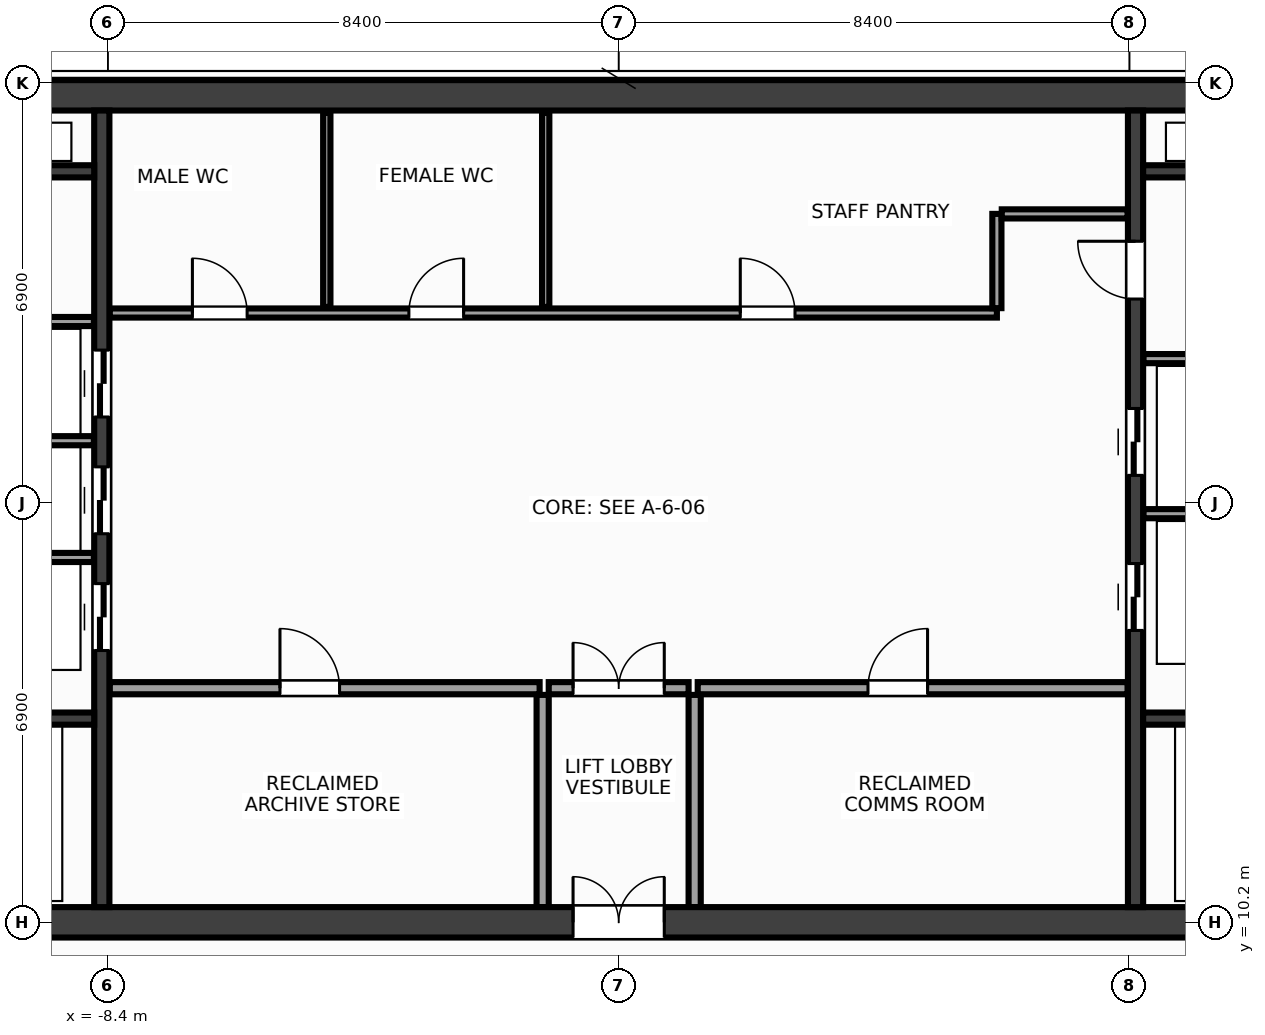
"""IFC4 building model, lengths in metres.
Left out: names, types, materials, properties, quantities, classifications, styles, units other than length and angle.
Written with IfcOpenShell. Run it as: python <this file> out.ifc"""

import sys

from ifc_helpers import new_model, si_unit, direction, frame, frame_2d, origin, place, context, subcontext, project, spatial, rectangle, extrude, source, transform, mapped, element, fill, save


model = new_model("IFC4")
c1 = context("Model", 3, precision=1e-05, world=origin(), true_north=direction((0.0, 1.0)))
c2 = subcontext(c1, "Body", "Model", "MODEL_VIEW")
j1 = project(units=[si_unit("LENGTHUNIT", "METRE"), si_unit("PLANEANGLEUNIT", "RADIAN")], contexts=[c1])
p1 = place(None, origin())
s1 = spatial("IfcSite", under=j1, at=p1, CompositionType="ELEMENT")
p2 = place(p1, origin())
s2 = spatial("IfcBuilding", under=s1, at=p2, CompositionType="ELEMENT")
p3 = place(p2, frame((0.0, 0.0, 290.0)))
s3 = spatial("IfcBuildingStorey", under=s2, at=p3, CompositionType="ELEMENT", Elevation=290.0)
m1 = source(origin(), c2, "Body", "SweptSolid", [
    extrude(rectangle(XDim=31.7, YDim=0.5, at=frame_2d((15.85, 0.0))), origin(), (0.0, 0.0, 1.0), 3.6),
])
p4 = place(p3, frame((-15.85, 23.8, 0.0), z_axis=(0.0, 0.0, 1.0), x_axis=(1.0, 0.0, 0.0)))
e1 = element("IfcWall", 1, at=p4, inside=s3, PredefinedType="SHEAR", context=c2, shape_type="MappedRepresentation", body=[
    mapped(m1, transform((0.0, 0.0, 0.0), x_axis=(1.0, 0.0, 0.0), y_axis=(0.0, 1.0, 0.0), z_axis=(0.0, 0.0, 1.0), scale=1.0)),
])
m2 = source(origin(), c2, "Body", "SweptSolid", [
    extrude(rectangle(XDim=32.4, YDim=0.5, at=frame_2d((16.2, 0.0))), origin(), (0.0, 0.0, 1.0), 3.6),
])
p5 = place(p3, frame((-16.2, 10.2, 0.0), z_axis=(0.0, 0.0, 1.0), x_axis=(1.0, 0.0, 0.0)))
e2 = element("IfcWall", 2, at=p5, inside=s3, PredefinedType="SHEAR", context=c2, shape_type="MappedRepresentation", body=[
    mapped(m2, transform((0.0, 0.0, 0.0), x_axis=(1.0, 0.0, 0.0), y_axis=(0.0, 1.0, 0.0), z_axis=(0.0, 0.0, 1.0), scale=1.0)),
])
p6 = place(p5, frame((2.05, 0.0, 0.0)))
e3 = element("IfcOpeningElement", 3, at=p6, cuts=e2, PredefinedType="OPENING", context=c2, shape_type="SweptSolid", body=[
    extrude(rectangle(XDim=1.6, YDim=2.15, at=frame_2d((0.8, 1.075))), frame((0.0, 0.262, 0.0), z_axis=(0.0, -1.0, 0.0), x_axis=(1.0, 0.0, 0.0)), (0.0, 0.0, 1.0), 0.524),
])
p7 = place(p5, frame((28.75, 0.0, 0.0)))
e4 = element("IfcOpeningElement", 4, at=p7, cuts=e2, PredefinedType="OPENING", context=c2, shape_type="SweptSolid", body=[
    extrude(rectangle(XDim=1.6, YDim=2.15, at=frame_2d((0.8, 1.075))), frame((0.0, 0.262, 0.0), z_axis=(0.0, -1.0, 0.0), x_axis=(1.0, 0.0, 0.0)), (0.0, 0.0, 1.0), 0.524),
])
p8 = place(p5, frame((15.45, 0.0, 0.0)))
e5 = element("IfcOpeningElement", 5, at=p8, cuts=e2, PredefinedType="OPENING", context=c2, shape_type="SweptSolid", body=[
    extrude(rectangle(XDim=1.5, YDim=2.2, at=frame_2d((0.75, 1.1))), frame((0.0, 0.262, 0.0), z_axis=(0.0, -1.0, 0.0), x_axis=(1.0, 0.0, 0.0)), (0.0, 0.0, 1.0), 0.524),
])
m3 = source(origin(), c2, "Body", "SweptSolid", [
    extrude(rectangle(XDim=13.1, YDim=0.25, at=frame_2d((6.55, 0.0))), origin(), (0.0, 0.0, 1.0), 3.6),
])
p9 = place(p3, frame((-8.5, 10.45, 0.0), z_axis=(0.0, 0.0, 1.0), x_axis=(0.0, 1.0, 0.0)))
e6 = element("IfcWall", 6, at=p9, inside=s3, PredefinedType="SHEAR", context=c2, shape_type="MappedRepresentation", body=[
    mapped(m3, transform((0.0, 0.0, 0.0), x_axis=(1.0, 0.0, 0.0), y_axis=(0.0, 1.0, 0.0), z_axis=(0.0, 0.0, 1.0), scale=1.0)),
])
p10 = place(p9, frame((4.22, 0.0, 0.0)))
e7 = element("IfcOpeningElement", 7, at=p10, cuts=e6, PredefinedType="OPENING", context=c2, shape_type="SweptSolid", body=[
    extrude(rectangle(XDim=1.1, YDim=2.15, at=frame_2d((0.55, 1.075))), frame((0.0, 0.137, 0.0), z_axis=(0.0, -1.0, 0.0), x_axis=(1.0, 0.0, 0.0)), (0.0, 0.0, 1.0), 0.274),
])
p11 = place(p9, frame((6.14, 0.0, 0.0)))
e8 = element("IfcOpeningElement", 8, at=p11, cuts=e6, PredefinedType="OPENING", context=c2, shape_type="SweptSolid", body=[
    extrude(rectangle(XDim=1.1, YDim=2.15, at=frame_2d((0.55, 1.075))), frame((0.0, 0.137, 0.0), z_axis=(0.0, -1.0, 0.0), x_axis=(1.0, 0.0, 0.0)), (0.0, 0.0, 1.0), 0.274),
])
p12 = place(p9, frame((8.06, 0.0, 0.0)))
e9 = element("IfcOpeningElement", 9, at=p12, cuts=e6, PredefinedType="OPENING", context=c2, shape_type="SweptSolid", body=[
    extrude(rectangle(XDim=1.1, YDim=2.15, at=frame_2d((0.55, 1.075))), frame((0.0, 0.137, 0.0), z_axis=(0.0, -1.0, 0.0), x_axis=(1.0, 0.0, 0.0)), (0.0, 0.0, 1.0), 0.274),
])
p13 = place(p3, frame((8.5, 10.45, 0.0), z_axis=(0.0, 0.0, 1.0), x_axis=(0.0, 1.0, 0.0)))
e10 = element("IfcWall", 10, at=p13, inside=s3, PredefinedType="SHEAR", context=c2, shape_type="MappedRepresentation", body=[
    mapped(m3, transform((0.0, 0.0, 0.0), x_axis=(1.0, 0.0, 0.0), y_axis=(0.0, 1.0, 0.0), z_axis=(0.0, 0.0, 1.0), scale=1.0)),
])
p14 = place(p13, frame((4.55, 0.0, 0.0)))
e11 = element("IfcOpeningElement", 11, at=p14, cuts=e10, PredefinedType="OPENING", context=c2, shape_type="SweptSolid", body=[
    extrude(rectangle(XDim=1.1, YDim=2.15, at=frame_2d((0.55, 1.075))), frame((0.0, 0.137, 0.0), z_axis=(0.0, -1.0, 0.0), x_axis=(1.0, 0.0, 0.0)), (0.0, 0.0, 1.0), 0.274),
])
p15 = place(p13, frame((7.1, 0.0, 0.0)))
e12 = element("IfcOpeningElement", 12, at=p15, cuts=e10, PredefinedType="OPENING", context=c2, shape_type="SweptSolid", body=[
    extrude(rectangle(XDim=1.1, YDim=2.15, at=frame_2d((0.55, 1.075))), frame((0.0, 0.137, 0.0), z_axis=(0.0, -1.0, 0.0), x_axis=(1.0, 0.0, 0.0)), (0.0, 0.0, 1.0), 0.274),
])
p16 = place(p13, frame((10.0, 0.0, 0.0)))
e13 = element("IfcOpeningElement", 13, at=p16, cuts=e10, PredefinedType="OPENING", context=c2, shape_type="SweptSolid", body=[
    extrude(rectangle(XDim=0.95, YDim=2.15, at=frame_2d((0.475, 1.075))), frame((0.0, 0.137, 0.0), z_axis=(0.0, -1.0, 0.0), x_axis=(1.0, 0.0, 0.0)), (0.0, 0.0, 1.0), 0.274),
])
m4 = source(origin(), c2, "Body", "SweptSolid", [
    extrude(rectangle(XDim=2.825, YDim=0.2, at=frame_2d((1.413, 0.0))), origin(), (0.0, 0.0, 1.0), 3.6),
])
for number, where, z_axis, x_axis in (
    (14, (-11.45, 13.55, 0.0), (0.0, 0.0, 1.0), (1.0, 0.0, 0.0)),
    (15, (8.625, 13.55, 0.0), (0.0, 0.0, 1.0), (1.0, 0.0, 0.0)),
):
    element("IfcWall", number, at=place(p3, frame(where, z_axis=z_axis, x_axis=x_axis)), inside=s3, PredefinedType="SHEAR", context=c2, shape_type="MappedRepresentation", body=[
        mapped(m4, transform((0.0, 0.0, 0.0), x_axis=(1.0, 0.0, 0.0), y_axis=(0.0, 1.0, 0.0), z_axis=(0.0, 0.0, 1.0), scale=1.0)),
    ])
m5 = source(origin(), c2, "Body", "SweptSolid", [
    extrude(rectangle(XDim=3.02, YDim=0.2, at=frame_2d((1.51, 0.0))), origin(), (0.0, 0.0, 1.0), 3.6),
])
for number, where, z_axis, x_axis in (
    (16, (-11.645, 22.55, 0.0), (0.0, 0.0, 1.0), (1.0, 0.0, 0.0)),
    (17, (8.625, 22.55, 0.0), (0.0, 0.0, 1.0), (1.0, 0.0, 0.0)),
):
    element("IfcWall", number, at=place(p3, frame(where, z_axis=z_axis, x_axis=x_axis)), inside=s3, PredefinedType="SHEAR", context=c2, shape_type="MappedRepresentation", body=[
        mapped(m5, transform((0.0, 0.0, 0.0), x_axis=(1.0, 0.0, 0.0), y_axis=(0.0, 1.0, 0.0), z_axis=(0.0, 0.0, 1.0), scale=1.0)),
    ])
m6 = source(origin(), c2, "Body", "SweptSolid", [
    extrude(rectangle(XDim=3.01, YDim=0.15, at=frame_2d((1.505, 0.0))), origin(), (0.0, 0.0, 1.0), 3.3),
])
for number, where, z_axis, x_axis in (
    (18, (-11.64, 16.2, 0.0), (0.0, 0.0, 1.0), (1.0, 0.0, 0.0)),
    (19, (-11.64, 18.12, 0.0), (0.0, 0.0, 1.0), (1.0, 0.0, 0.0)),
    (20, (-11.64, 20.08, 0.0), (0.0, 0.0, 1.0), (1.0, 0.0, 0.0)),
    (21, (8.63, 16.92, 0.0), (0.0, 0.0, 1.0), (1.0, 0.0, 0.0)),
    (22, (8.63, 19.47, 0.0), (0.0, 0.0, 1.0), (1.0, 0.0, 0.0)),
):
    element("IfcWall", number, at=place(p3, frame(where, z_axis=z_axis, x_axis=x_axis)), inside=s3, PredefinedType="PARTITIONING", context=c2, shape_type="MappedRepresentation", body=[
        mapped(m6, transform((0.0, 0.0, 0.0), x_axis=(1.0, 0.0, 0.0), y_axis=(0.0, 1.0, 0.0), z_axis=(0.0, 0.0, 1.0), scale=1.0)),
    ])
m7 = source(origin(), c2, "Body", "SweptSolid", [
    extrude(rectangle(XDim=7.07, YDim=0.2, at=frame_2d((3.535, 0.0))), origin(), (0.0, 0.0, 1.0), 3.3),
])
p17 = place(p3, frame((-8.37, 14.05, 0.0), z_axis=(0.0, 0.0, 1.0), x_axis=(1.0, 0.0, 0.0)))
e23 = element("IfcWall", 23, at=p17, inside=s3, PredefinedType="PARTITIONING", context=c2, shape_type="MappedRepresentation", body=[
    mapped(m7, transform((0.0, 0.0, 0.0), x_axis=(1.0, 0.0, 0.0), y_axis=(0.0, 1.0, 0.0), z_axis=(0.0, 0.0, 1.0), scale=1.0)),
])
p18 = place(p17, frame((2.8, 0.0, 0.0)))
e24 = element("IfcOpeningElement", 24, at=p18, cuts=e23, PredefinedType="OPENING", context=c2, shape_type="SweptSolid", body=[
    extrude(rectangle(XDim=0.98, YDim=2.15, at=frame_2d((0.49, 1.075))), frame((0.0, 0.112, 0.0), z_axis=(0.0, -1.0, 0.0), x_axis=(1.0, 0.0, 0.0)), (0.0, 0.0, 1.0), 0.224),
])
p19 = place(p3, frame((1.3, 14.05, 0.0), z_axis=(0.0, 0.0, 1.0), x_axis=(1.0, 0.0, 0.0)))
e25 = element("IfcWall", 25, at=p19, inside=s3, PredefinedType="PARTITIONING", context=c2, shape_type="MappedRepresentation", body=[
    mapped(m7, transform((0.0, 0.0, 0.0), x_axis=(1.0, 0.0, 0.0), y_axis=(0.0, 1.0, 0.0), z_axis=(0.0, 0.0, 1.0), scale=1.0)),
])
p20 = place(p19, frame((2.8, 0.0, 0.0)))
e26 = element("IfcOpeningElement", 26, at=p20, cuts=e25, PredefinedType="OPENING", context=c2, shape_type="SweptSolid", body=[
    extrude(rectangle(XDim=0.98, YDim=2.15, at=frame_2d((0.49, 1.075))), frame((0.0, 0.112, 0.0), z_axis=(0.0, -1.0, 0.0), x_axis=(1.0, 0.0, 0.0)), (0.0, 0.0, 1.0), 0.224),
])
m8 = source(origin(), c2, "Body", "SweptSolid", [
    extrude(rectangle(XDim=3.49, YDim=0.2, at=frame_2d((1.745, 0.0))), origin(), (0.0, 0.0, 1.0), 3.3),
])
for number, where, z_axis, x_axis in (
    (27, (-1.25, 10.45, 0.0), (0.0, 0.0, 1.0), (0.0, 1.0, 0.0)),
    (28, (1.25, 10.45, 0.0), (0.0, 0.0, 1.0), (0.0, 1.0, 0.0)),
):
    element("IfcWall", number, at=place(p3, frame(where, z_axis=z_axis, x_axis=x_axis)), inside=s3, PredefinedType="PARTITIONING", context=c2, shape_type="MappedRepresentation", body=[
        mapped(m8, transform((0.0, 0.0, 0.0), x_axis=(1.0, 0.0, 0.0), y_axis=(0.0, 1.0, 0.0), z_axis=(0.0, 0.0, 1.0), scale=1.0)),
    ])
m9 = source(origin(), c2, "Body", "SweptSolid", [
    extrude(rectangle(XDim=2.3, YDim=0.2, at=frame_2d((1.15, 0.0))), origin(), (0.0, 0.0, 1.0), 3.3),
])
p21 = place(p3, frame((-1.15, 14.05, 0.0), z_axis=(0.0, 0.0, 1.0), x_axis=(1.0, 0.0, 0.0)))
e29 = element("IfcWall", 29, at=p21, inside=s3, PredefinedType="PARTITIONING", context=c2, shape_type="MappedRepresentation", body=[
    mapped(m9, transform((0.0, 0.0, 0.0), x_axis=(1.0, 0.0, 0.0), y_axis=(0.0, 1.0, 0.0), z_axis=(0.0, 0.0, 1.0), scale=1.0)),
])
p22 = place(p21, frame((0.4, 0.0, 0.0)))
e30 = element("IfcOpeningElement", 30, at=p22, cuts=e29, PredefinedType="OPENING", context=c2, shape_type="SweptSolid", body=[
    extrude(rectangle(XDim=1.5, YDim=2.2, at=frame_2d((0.75, 1.1))), frame((0.0, 0.112, 0.0), z_axis=(0.0, -1.0, 0.0), x_axis=(1.0, 0.0, 0.0)), (0.0, 0.0, 1.0), 0.224),
])
m10 = source(origin(), c2, "Body", "SweptSolid", [
    extrude(rectangle(XDim=14.59, YDim=0.15, at=frame_2d((7.295, 0.0))), origin(), (0.0, 0.0, 1.0), 3.3),
])
p23 = place(p3, frame((-8.37, 20.22, 0.0), z_axis=(0.0, 0.0, 1.0), x_axis=(1.0, 0.0, 0.0)))
e31 = element("IfcWall", 31, at=p23, inside=s3, PredefinedType="PARTITIONING", context=c2, shape_type="MappedRepresentation", body=[
    mapped(m10, transform((0.0, 0.0, 0.0), x_axis=(1.0, 0.0, 0.0), y_axis=(0.0, 1.0, 0.0), z_axis=(0.0, 0.0, 1.0), scale=1.0)),
])
p24 = place(p23, frame((1.36, 0.0, 0.0)))
e32 = element("IfcOpeningElement", 32, at=p24, cuts=e31, PredefinedType="OPENING", context=c2, shape_type="SweptSolid", body=[
    extrude(rectangle(XDim=0.9, YDim=2.15, at=frame_2d((0.45, 1.075))), frame((0.0, 0.087, 0.0), z_axis=(0.0, -1.0, 0.0), x_axis=(1.0, 0.0, 0.0)), (0.0, 0.0, 1.0), 0.174),
])
p25 = place(p23, frame((4.92, 0.0, 0.0)))
e33 = element("IfcOpeningElement", 33, at=p25, cuts=e31, PredefinedType="OPENING", context=c2, shape_type="SweptSolid", body=[
    extrude(rectangle(XDim=0.9, YDim=2.15, at=frame_2d((0.45, 1.075))), frame((0.0, 0.087, 0.0), z_axis=(0.0, -1.0, 0.0), x_axis=(1.0, 0.0, 0.0)), (0.0, 0.0, 1.0), 0.174),
])
p26 = place(p23, frame((10.37, 0.0, 0.0)))
e34 = element("IfcOpeningElement", 34, at=p26, cuts=e31, PredefinedType="OPENING", context=c2, shape_type="SweptSolid", body=[
    extrude(rectangle(XDim=0.9, YDim=2.15, at=frame_2d((0.45, 1.075))), frame((0.0, 0.087, 0.0), z_axis=(0.0, -1.0, 0.0), x_axis=(1.0, 0.0, 0.0)), (0.0, 0.0, 1.0), 0.174),
])
m11 = source(origin(), c2, "Body", "SweptSolid", [
    extrude(rectangle(XDim=1.55, YDim=0.15, at=frame_2d((0.775, 0.0))), origin(), (0.0, 0.0, 1.0), 3.3),
])
p27 = place(p3, frame((6.22, 20.3, 0.0), z_axis=(0.0, 0.0, 1.0), x_axis=(0.0, 1.0, 0.0)))
e35 = element("IfcWall", 35, at=p27, inside=s3, PredefinedType="PARTITIONING", context=c2, shape_type="MappedRepresentation", body=[
    mapped(m11, transform((0.0, 0.0, 0.0), x_axis=(1.0, 0.0, 0.0), y_axis=(0.0, 1.0, 0.0), z_axis=(0.0, 0.0, 1.0), scale=1.0)),
])
m12 = source(origin(), c2, "Body", "SweptSolid", [
    extrude(rectangle(XDim=2.07, YDim=0.15, at=frame_2d((1.035, 0.0))), origin(), (0.0, 0.0, 1.0), 3.3),
])
p28 = place(p3, frame((6.3, 21.85, 0.0), z_axis=(0.0, 0.0, 1.0), x_axis=(1.0, 0.0, 0.0)))
e36 = element("IfcWall", 36, at=p28, inside=s3, PredefinedType="PARTITIONING", context=c2, shape_type="MappedRepresentation", body=[
    mapped(m12, transform((0.0, 0.0, 0.0), x_axis=(1.0, 0.0, 0.0), y_axis=(0.0, 1.0, 0.0), z_axis=(0.0, 0.0, 1.0), scale=1.0)),
])
m13 = source(origin(), c2, "Body", "SweptSolid", [
    extrude(rectangle(XDim=3.19, YDim=0.12, at=frame_2d((1.595, 0.0))), origin(), (0.0, 0.0, 1.0), 3.3),
])
for number, where, z_axis, x_axis in (
    (37, (-4.8, 20.32, 0.0), (0.0, 0.0, 1.0), (0.0, 1.0, 0.0)),
    (38, (-1.2, 20.32, 0.0), (0.0, 0.0, 1.0), (0.0, 1.0, 0.0)),
):
    element("IfcWall", number, at=place(p3, frame(where, z_axis=z_axis, x_axis=x_axis)), inside=s3, PredefinedType="PARTITIONING", context=c2, shape_type="MappedRepresentation", body=[
        mapped(m13, transform((0.0, 0.0, 0.0), x_axis=(1.0, 0.0, 0.0), y_axis=(0.0, 1.0, 0.0), z_axis=(0.0, 0.0, 1.0), scale=1.0)),
    ])
m14 = source(origin(), c2, "Body", "SweptSolid", [
    extrude(rectangle(XDim=1.1, YDim=2.15, at=frame_2d((0.55, 1.075))), frame((0.0, 0.025, 0.0), z_axis=(0.0, -1.0, 0.0), x_axis=(1.0, 0.0, 0.0)), (0.0, 0.0, 1.0), 0.05),
])
p29 = place(p10, origin())
e39 = element("IfcDoor", 39, at=p29, inside=s3, OperationType="DOUBLE_DOOR_SLIDING", PredefinedType="DOOR", context=c2, shape_type="MappedRepresentation", body=[
    mapped(m14, transform((0.0, 0.0, 0.0), x_axis=(1.0, 0.0, 0.0), y_axis=(0.0, 1.0, 0.0), z_axis=(0.0, 0.0, 1.0), scale=1.0)),
])
fill(e7, e39)
p30 = place(p11, origin())
e40 = element("IfcDoor", 40, at=p30, inside=s3, OperationType="DOUBLE_DOOR_SLIDING", PredefinedType="DOOR", context=c2, shape_type="MappedRepresentation", body=[
    mapped(m14, transform((0.0, 0.0, 0.0), x_axis=(1.0, 0.0, 0.0), y_axis=(0.0, 1.0, 0.0), z_axis=(0.0, 0.0, 1.0), scale=1.0)),
])
fill(e8, e40)
p31 = place(p12, origin())
e41 = element("IfcDoor", 41, at=p31, inside=s3, OperationType="DOUBLE_DOOR_SLIDING", PredefinedType="DOOR", context=c2, shape_type="MappedRepresentation", body=[
    mapped(m14, transform((0.0, 0.0, 0.0), x_axis=(1.0, 0.0, 0.0), y_axis=(0.0, 1.0, 0.0), z_axis=(0.0, 0.0, 1.0), scale=1.0)),
])
fill(e9, e41)
p32 = place(p14, origin())
e42 = element("IfcDoor", 42, at=p32, inside=s3, OperationType="DOUBLE_DOOR_SLIDING", PredefinedType="DOOR", context=c2, shape_type="MappedRepresentation", body=[
    mapped(m14, transform((0.0, 0.0, 0.0), x_axis=(1.0, 0.0, 0.0), y_axis=(0.0, 1.0, 0.0), z_axis=(0.0, 0.0, 1.0), scale=1.0)),
])
fill(e11, e42)
p33 = place(p15, origin())
e43 = element("IfcDoor", 43, at=p33, inside=s3, OperationType="DOUBLE_DOOR_SLIDING", PredefinedType="DOOR", context=c2, shape_type="MappedRepresentation", body=[
    mapped(m14, transform((0.0, 0.0, 0.0), x_axis=(1.0, 0.0, 0.0), y_axis=(0.0, 1.0, 0.0), z_axis=(0.0, 0.0, 1.0), scale=1.0)),
])
fill(e12, e43)
m15 = source(origin(), c2, "Body", "SweptSolid", [
    extrude(rectangle(XDim=0.95, YDim=2.15, at=frame_2d((0.475, 1.075))), frame((0.0, 0.025, 0.0), z_axis=(0.0, -1.0, 0.0), x_axis=(1.0, 0.0, 0.0)), (0.0, 0.0, 1.0), 0.05),
])
p34 = place(p16, origin())
e44 = element("IfcDoor", 44, at=p34, inside=s3, OperationType="SINGLE_SWING_RIGHT", PredefinedType="DOOR", context=c2, shape_type="MappedRepresentation", body=[
    mapped(m15, transform((0.0, 0.0, 0.0), x_axis=(1.0, 0.0, 0.0), y_axis=(0.0, 1.0, 0.0), z_axis=(0.0, 0.0, 1.0), scale=1.0)),
])
fill(e13, e44)
m16 = source(origin(), c2, "Body", "SweptSolid", [
    extrude(rectangle(XDim=0.98, YDim=2.15, at=frame_2d((0.49, 1.075))), frame((0.0, 0.025, 0.0), z_axis=(0.0, -1.0, 0.0), x_axis=(1.0, 0.0, 0.0)), (0.0, 0.0, 1.0), 0.05),
])
p35 = place(p18, origin())
e45 = element("IfcDoor", 45, at=p35, inside=s3, OperationType="SINGLE_SWING_LEFT", PredefinedType="DOOR", context=c2, shape_type="MappedRepresentation", body=[
    mapped(m16, transform((0.0, 0.0, 0.0), x_axis=(1.0, 0.0, 0.0), y_axis=(0.0, 1.0, 0.0), z_axis=(0.0, 0.0, 1.0), scale=1.0)),
])
fill(e24, e45)
p36 = place(p20, origin())
e46 = element("IfcDoor", 46, at=p36, inside=s3, OperationType="SINGLE_SWING_RIGHT", PredefinedType="DOOR", context=c2, shape_type="MappedRepresentation", body=[
    mapped(m16, transform((0.0, 0.0, 0.0), x_axis=(1.0, 0.0, 0.0), y_axis=(0.0, 1.0, 0.0), z_axis=(0.0, 0.0, 1.0), scale=1.0)),
])
fill(e26, e46)
m17 = source(origin(), c2, "Body", "SweptSolid", [
    extrude(rectangle(XDim=1.5, YDim=2.2, at=frame_2d((0.75, 1.1))), frame((0.0, 0.025, 0.0), z_axis=(0.0, -1.0, 0.0), x_axis=(1.0, 0.0, 0.0)), (0.0, 0.0, 1.0), 0.05),
])
p37 = place(p22, origin())
e47 = element("IfcDoor", 47, at=p37, inside=s3, OperationType="DOUBLE_DOOR_SINGLE_SWING", PredefinedType="DOOR", context=c2, shape_type="MappedRepresentation", body=[
    mapped(m17, transform((0.0, 0.0, 0.0), x_axis=(1.0, 0.0, 0.0), y_axis=(0.0, 1.0, 0.0), z_axis=(0.0, 0.0, 1.0), scale=1.0)),
])
fill(e30, e47)
p38 = place(p8, origin())
e48 = element("IfcDoor", 48, at=p38, inside=s3, OperationType="DOUBLE_DOOR_SINGLE_SWING", PredefinedType="DOOR", context=c2, shape_type="MappedRepresentation", body=[
    mapped(m17, transform((0.0, 0.0, 0.0), x_axis=(1.0, 0.0, 0.0), y_axis=(0.0, 1.0, 0.0), z_axis=(0.0, 0.0, 1.0), scale=1.0)),
])
fill(e5, e48)
m18 = source(origin(), c2, "Body", "SweptSolid", [
    extrude(rectangle(XDim=0.9, YDim=2.15, at=frame_2d((0.45, 1.075))), frame((0.0, 0.025, 0.0), z_axis=(0.0, -1.0, 0.0), x_axis=(1.0, 0.0, 0.0)), (0.0, 0.0, 1.0), 0.05),
])
p39 = place(p24, origin())
e49 = element("IfcDoor", 49, at=p39, inside=s3, OperationType="SINGLE_SWING_LEFT", PredefinedType="DOOR", context=c2, shape_type="MappedRepresentation", body=[
    mapped(m18, transform((0.0, 0.0, 0.0), x_axis=(1.0, 0.0, 0.0), y_axis=(0.0, 1.0, 0.0), z_axis=(0.0, 0.0, 1.0), scale=1.0)),
])
fill(e32, e49)
p40 = place(p25, origin())
e50 = element("IfcDoor", 50, at=p40, inside=s3, OperationType="SINGLE_SWING_RIGHT", PredefinedType="DOOR", context=c2, shape_type="MappedRepresentation", body=[
    mapped(m18, transform((0.0, 0.0, 0.0), x_axis=(1.0, 0.0, 0.0), y_axis=(0.0, 1.0, 0.0), z_axis=(0.0, 0.0, 1.0), scale=1.0)),
])
fill(e33, e50)
p41 = place(p26, origin())
e51 = element("IfcDoor", 51, at=p41, inside=s3, OperationType="SINGLE_SWING_LEFT", PredefinedType="DOOR", context=c2, shape_type="MappedRepresentation", body=[
    mapped(m18, transform((0.0, 0.0, 0.0), x_axis=(1.0, 0.0, 0.0), y_axis=(0.0, 1.0, 0.0), z_axis=(0.0, 0.0, 1.0), scale=1.0)),
])
fill(e34, e51)
save(model, sys.argv[1])
